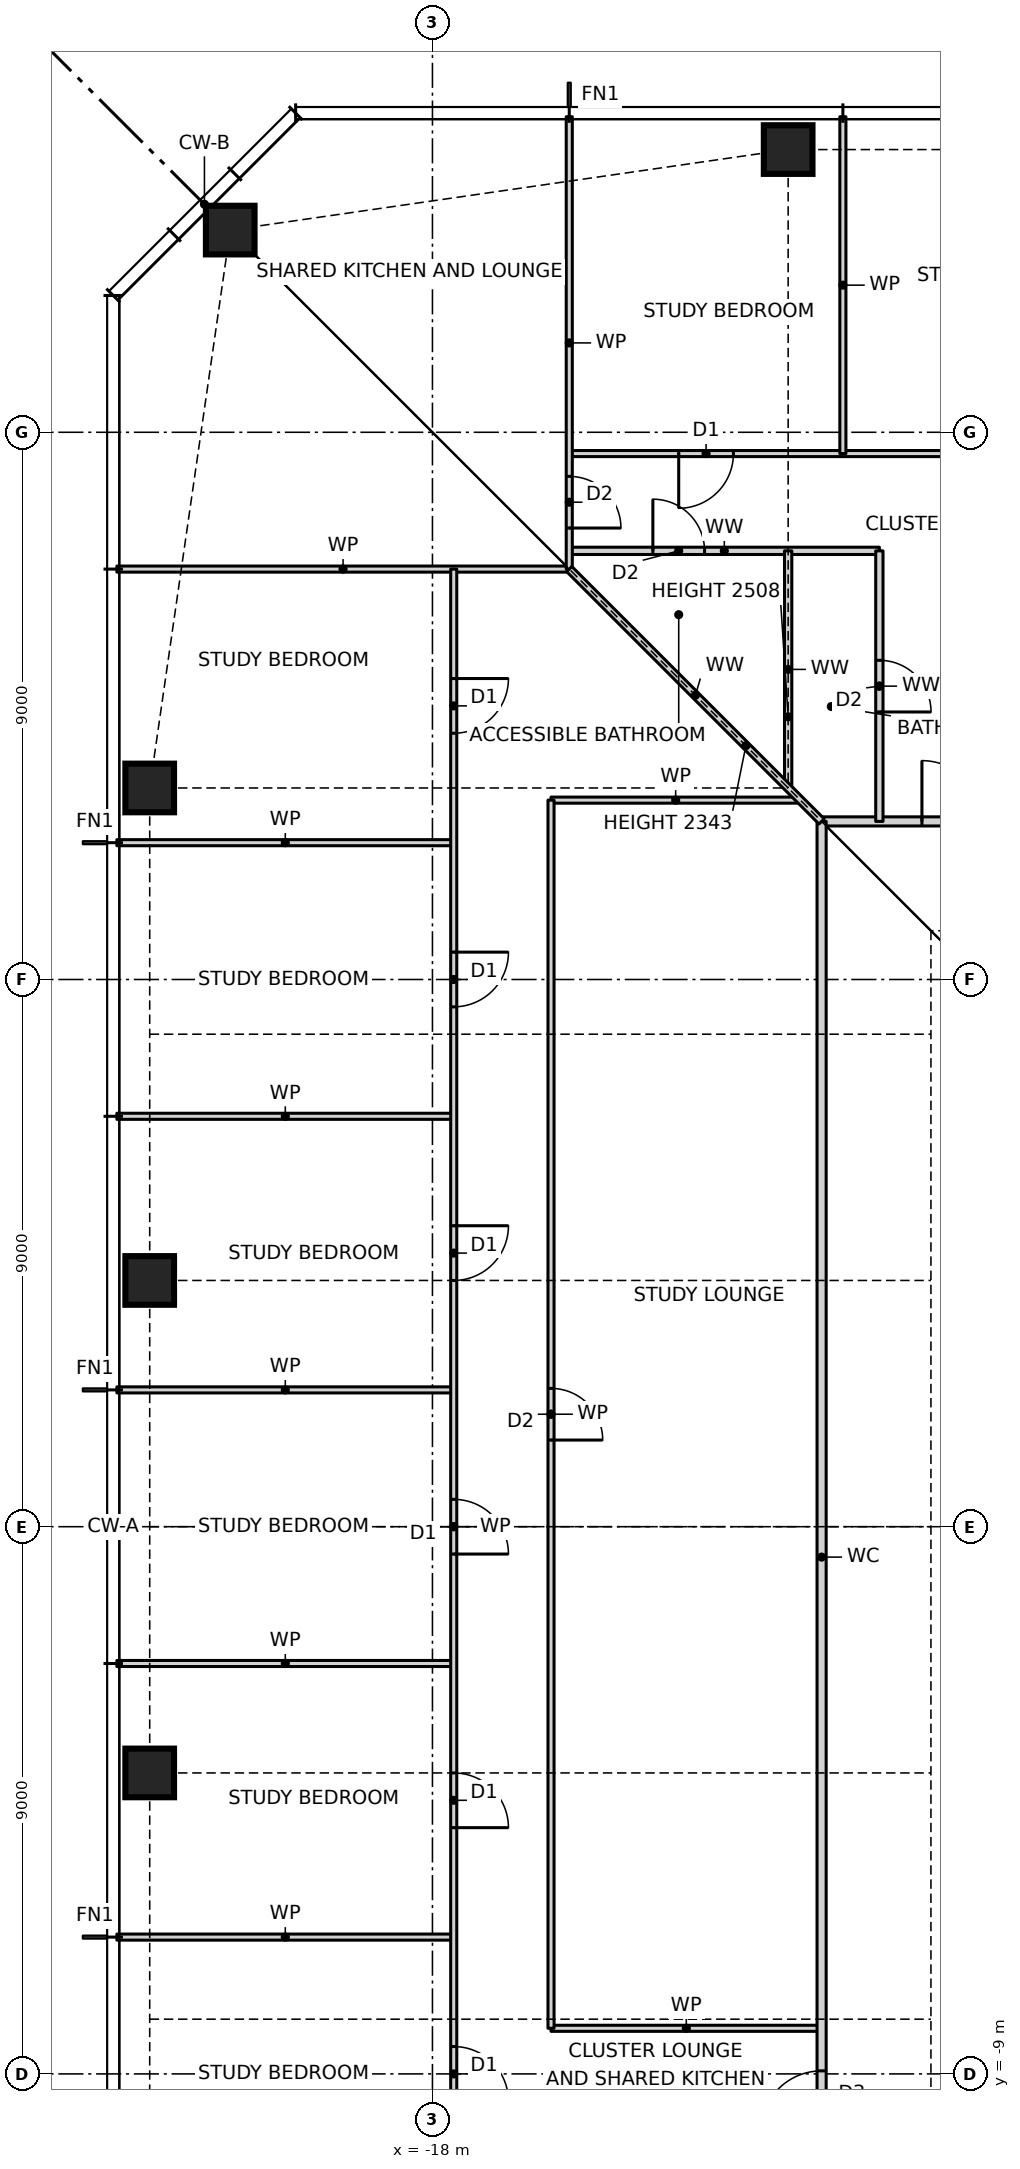
"""IFC4 building model, lengths in metres.
Left out: names, types, materials, properties, quantities, classifications, styles, units other than length and angle.
Written with IfcOpenShell. Run it as: python <this file> out.ifc"""

import sys

from ifc_helpers import new_model, si_unit, direction, frame, frame_2d, origin, origin_2d, place, context, subcontext, project, spatial, rectangle, hollow_rectangle, extrude, element, fill, save


model = new_model("IFC4")
c1 = context("Model", 3, precision=1e-05, world=origin(), true_north=direction((0.0, 1.0)))
c2 = subcontext(c1, "Body", "Model", "MODEL_VIEW")
j1 = project(units=[si_unit("LENGTHUNIT", "METRE"), si_unit("PLANEANGLEUNIT", "RADIAN")], contexts=[c1])
p1 = place(None, origin())
s1 = spatial("IfcSite", under=j1, at=p1, CompositionType="ELEMENT")
p2 = place(p1, origin())
s2 = spatial("IfcBuilding", under=s1, at=p2, CompositionType="ELEMENT")
p3 = place(p2, frame((0.0, 0.0, 22.0)))
s3 = spatial("IfcBuildingStorey", under=s2, at=p3, CompositionType="ELEMENT", Elevation=22.0)
for number, where, z_axis, x_axis in (
    (1, (-12.15, 22.65, 0.0), (0.0, 0.0, 1.0), (1.0, 0.0, 0.0)),
    (2, (-21.326, 21.326, 0.0), (0.0, 0.0, 1.0), (1.0, 0.0, 0.0)),
    (3, (-22.65, 12.15, 0.0), (0.0, 0.0, 1.0), (1.0, 0.0, 0.0)),
    (4, (-22.65, 4.05, 0.0), (0.0, 0.0, 1.0), (1.0, 0.0, 0.0)),
    (5, (-22.65, -4.05, 0.0), (0.0, 0.0, 1.0), (1.0, 0.0, 0.0)),
):
    element("IfcColumn", number, at=place(p3, frame(where, z_axis=z_axis, x_axis=x_axis)), inside=s3, PredefinedType="COLUMN", context=c2, shape_type="SweptSolid", body=[
        extrude(hollow_rectangle(XDim=0.8, YDim=0.8, WallThickness=0.09, at=origin_2d()), origin(), (0.0, 0.0, 1.0), 3.5),
    ])
p4 = place(p3, frame((-16.05, -8.25, 0.0), z_axis=(0.0, 0.0, 1.0), x_axis=(1.0, 0.0, 0.0)))
e6 = element("IfcWall", 6, at=p4, inside=s3, PredefinedType="PARTITIONING", context=c2, shape_type="SweptSolid", body=[
    extrude(rectangle(XDim=4.45, YDim=0.1, at=frame_2d((2.225, 0.0))), origin(), (0.0, 0.0, 1.0), 3.27),
])
for number, where, z_axis, x_axis in (
    (7, (-23.19, -6.75, 0.0), (0.0, 0.0, 1.0), (1.0, 0.0, 0.0)),
    (8, (-23.19, -2.25, 0.0), (0.0, 0.0, 1.0), (1.0, 0.0, 0.0)),
    (9, (-23.19, 2.25, 0.0), (0.0, 0.0, 1.0), (1.0, 0.0, 0.0)),
    (10, (-23.19, 6.75, 0.0), (0.0, 0.0, 1.0), (1.0, 0.0, 0.0)),
    (11, (-23.19, 11.25, 0.0), (0.0, 0.0, 1.0), (1.0, 0.0, 0.0)),
):
    element("IfcWall", number, at=place(p3, frame(where, z_axis=z_axis, x_axis=x_axis)), inside=s3, PredefinedType="PARTITIONING", context=c2, shape_type="SweptSolid", body=[
        extrude(rectangle(XDim=5.54, YDim=0.1, at=frame_2d((2.77, 0.0))), origin(), (0.0, 0.0, 1.0), 3.27),
    ])
p5 = place(p3, frame((-11.6, 11.6, 0.0), z_axis=(0.0, 0.0, 1.0), x_axis=(1.0, 0.0, 0.0)))
e12 = element("IfcWall", 12, at=p5, inside=s3, PredefinedType="PARTITIONING", context=c2, shape_type="SweptSolid", body=[
    extrude(rectangle(XDim=23.2, YDim=0.15, at=frame_2d((11.6, 0.0))), origin(), (0.0, 0.0, 1.0), 3.27),
])
p6 = place(p5, frame((1.65, 0.0, 0.0)))
e13 = element("IfcOpeningElement", 13, at=p6, cuts=e12, PredefinedType="OPENING", context=c2, shape_type="SweptSolid", body=[
    extrude(rectangle(XDim=1.0, YDim=2.1, at=frame_2d((0.5, 1.05))), frame((0.0, 0.085, 0.0), z_axis=(0.0, -1.0, 0.0), x_axis=(1.0, 0.0, 0.0)), (0.0, 0.0, 1.0), 0.17),
])
p7 = place(p3, frame((-16.05, 11.95, 0.0), z_axis=(0.0, 0.0, 1.0), x_axis=(1.0, 0.0, 0.0)))
e14 = element("IfcWall", 14, at=p7, inside=s3, PredefinedType="PARTITIONING", context=c2, shape_type="SweptSolid", body=[
    extrude(rectangle(XDim=4.1, YDim=0.1, at=frame_2d((2.05, 0.0))), origin(), (0.0, 0.0, 1.0), 3.27),
])
p8 = place(p3, frame((-23.19, 15.75, 0.0), z_axis=(0.0, 0.0, 1.0), x_axis=(1.0, 0.0, 0.0)))
e15 = element("IfcWall", 15, at=p8, inside=s3, PredefinedType="PARTITIONING", context=c2, shape_type="SweptSolid", body=[
    extrude(rectangle(XDim=7.44, YDim=0.1, at=frame_2d((3.72, 0.0))), origin(), (0.0, 0.0, 1.0), 3.27),
])
p9 = place(p3, frame((-15.75, 16.05, 0.0), z_axis=(0.0, 0.0, 1.0), x_axis=(1.0, 0.0, 0.0)))
e16 = element("IfcWall", 16, at=p9, inside=s3, PredefinedType="PARTITIONING", context=c2, shape_type="SweptSolid", body=[
    extrude(rectangle(XDim=5.1, YDim=0.12, at=frame_2d((2.55, 0.0))), origin(), (0.0, 0.0, 1.0), 3.27),
])
p10 = place(p9, frame((1.375, 0.0, 0.0)))
e17 = element("IfcOpeningElement", 17, at=p10, cuts=e16, PredefinedType="OPENING", context=c2, shape_type="SweptSolid", body=[
    extrude(rectangle(XDim=0.85, YDim=2.1, at=frame_2d((0.425, 1.05))), frame((0.0, 0.07, 0.0), z_axis=(0.0, -1.0, 0.0), x_axis=(1.0, 0.0, 0.0)), (0.0, 0.0, 1.0), 0.14),
])
p11 = place(p3, frame((-15.75, 17.65, 0.0), z_axis=(0.0, 0.0, 1.0), x_axis=(1.0, 0.0, 0.0)))
e18 = element("IfcWall", 18, at=p11, inside=s3, PredefinedType="PARTITIONING", context=c2, shape_type="SweptSolid", body=[
    extrude(rectangle(XDim=31.5, YDim=0.1, at=frame_2d((15.75, 0.0))), origin(), (0.0, 0.0, 1.0), 3.27),
])
p12 = place(p11, frame((28.8, 0.0, 0.0)))
e19 = element("IfcOpeningElement", 19, at=p12, cuts=e18, PredefinedType="OPENING", context=c2, shape_type="SweptSolid", body=[
    extrude(rectangle(XDim=0.9, YDim=2.1, at=frame_2d((0.45, 1.05))), frame((0.0, 0.06, 0.0), z_axis=(0.0, -1.0, 0.0), x_axis=(1.0, 0.0, 0.0)), (0.0, 0.0, 1.0), 0.12),
])
p13 = place(p11, frame((24.3, 0.0, 0.0)))
e20 = element("IfcOpeningElement", 20, at=p13, cuts=e18, PredefinedType="OPENING", context=c2, shape_type="SweptSolid", body=[
    extrude(rectangle(XDim=0.9, YDim=2.1, at=frame_2d((0.45, 1.05))), frame((0.0, 0.06, 0.0), z_axis=(0.0, -1.0, 0.0), x_axis=(1.0, 0.0, 0.0)), (0.0, 0.0, 1.0), 0.12),
])
p14 = place(p11, frame((19.8, 0.0, 0.0)))
e21 = element("IfcOpeningElement", 21, at=p14, cuts=e18, PredefinedType="OPENING", context=c2, shape_type="SweptSolid", body=[
    extrude(rectangle(XDim=0.9, YDim=2.1, at=frame_2d((0.45, 1.05))), frame((0.0, 0.06, 0.0), z_axis=(0.0, -1.0, 0.0), x_axis=(1.0, 0.0, 0.0)), (0.0, 0.0, 1.0), 0.12),
])
p15 = place(p11, frame((15.3, 0.0, 0.0)))
e22 = element("IfcOpeningElement", 22, at=p15, cuts=e18, PredefinedType="OPENING", context=c2, shape_type="SweptSolid", body=[
    extrude(rectangle(XDim=0.9, YDim=2.1, at=frame_2d((0.45, 1.05))), frame((0.0, 0.06, 0.0), z_axis=(0.0, -1.0, 0.0), x_axis=(1.0, 0.0, 0.0)), (0.0, 0.0, 1.0), 0.12),
])
p16 = place(p11, frame((10.8, 0.0, 0.0)))
e23 = element("IfcOpeningElement", 23, at=p16, cuts=e18, PredefinedType="OPENING", context=c2, shape_type="SweptSolid", body=[
    extrude(rectangle(XDim=0.9, YDim=2.1, at=frame_2d((0.45, 1.05))), frame((0.0, 0.06, 0.0), z_axis=(0.0, -1.0, 0.0), x_axis=(1.0, 0.0, 0.0)), (0.0, 0.0, 1.0), 0.12),
])
p17 = place(p11, frame((6.3, 0.0, 0.0)))
e24 = element("IfcOpeningElement", 24, at=p17, cuts=e18, PredefinedType="OPENING", context=c2, shape_type="SweptSolid", body=[
    extrude(rectangle(XDim=0.9, YDim=2.1, at=frame_2d((0.45, 1.05))), frame((0.0, 0.06, 0.0), z_axis=(0.0, -1.0, 0.0), x_axis=(1.0, 0.0, 0.0)), (0.0, 0.0, 1.0), 0.12),
])
p18 = place(p11, frame((1.8, 0.0, 0.0)))
e25 = element("IfcOpeningElement", 25, at=p18, cuts=e18, PredefinedType="OPENING", context=c2, shape_type="SweptSolid", body=[
    extrude(rectangle(XDim=0.9, YDim=2.1, at=frame_2d((0.45, 1.05))), frame((0.0, 0.06, 0.0), z_axis=(0.0, -1.0, 0.0), x_axis=(1.0, 0.0, 0.0)), (0.0, 0.0, 1.0), 0.12),
])
p19 = place(p3, frame((-10.65, 11.6, 0.0), z_axis=(0.0, 0.0, 1.0), x_axis=(0.0, 1.0, 0.0)))
e26 = element("IfcWall", 26, at=p19, inside=s3, PredefinedType="PARTITIONING", context=c2, shape_type="SweptSolid", body=[
    extrude(rectangle(XDim=4.45, YDim=0.12, at=frame_2d((2.225, 0.0))), origin(), (0.0, 0.0, 1.0), 3.27),
])
p20 = place(p19, frame((1.8, 0.0, 0.0)))
e27 = element("IfcOpeningElement", 27, at=p20, cuts=e26, PredefinedType="OPENING", context=c2, shape_type="SweptSolid", body=[
    extrude(rectangle(XDim=0.85, YDim=2.1, at=frame_2d((0.425, 1.05))), frame((0.0, 0.07, 0.0), z_axis=(0.0, -1.0, 0.0), x_axis=(1.0, 0.0, 0.0)), (0.0, 0.0, 1.0), 0.14),
])
p21 = place(p3, frame((-11.25, 17.65, 0.0), z_axis=(0.0, 0.0, 1.0), x_axis=(0.0, 1.0, 0.0)))
e28 = element("IfcWall", 28, at=p21, inside=s3, PredefinedType="PARTITIONING", context=c2, shape_type="SweptSolid", body=[
    extrude(rectangle(XDim=5.54, YDim=0.1, at=frame_2d((2.77, 0.0))), origin(), (0.0, 0.0, 1.0), 3.27),
])
p22 = place(p3, frame((-11.6, -12.6, 0.0), z_axis=(0.0, 0.0, 1.0), x_axis=(0.0, 1.0, 0.0)))
e29 = element("IfcWall", 29, at=p22, inside=s3, PredefinedType="PARTITIONING", context=c2, shape_type="SweptSolid", body=[
    extrude(rectangle(XDim=24.2, YDim=0.15, at=frame_2d((12.1, 0.0))), origin(), (0.0, 0.0, 1.0), 3.27),
])
p23 = place(p22, frame((2.65, 0.0, 0.0)))
e30 = element("IfcOpeningElement", 30, at=p23, cuts=e29, PredefinedType="OPENING", context=c2, shape_type="SweptSolid", body=[
    extrude(rectangle(XDim=1.0, YDim=2.1, at=frame_2d((0.5, 1.05))), frame((0.0, 0.085, 0.0), z_axis=(0.0, -1.0, 0.0), x_axis=(1.0, 0.0, 0.0)), (0.0, 0.0, 1.0), 0.17),
])
p24 = place(p3, frame((-12.15, 12.15, 0.0), z_axis=(0.0, 0.0, 1.0), x_axis=(0.0, 1.0, 0.0)))
e31 = element("IfcWall", 31, at=p24, inside=s3, PredefinedType="PARTITIONING", context=c2, shape_type="SweptSolid", body=[
    extrude(rectangle(XDim=3.9, YDim=0.12, at=frame_2d((1.95, 0.0))), origin(), (0.0, 0.0, 1.0), 2.508),
])
p25 = place(p3, frame((-15.75, 15.75, 0.0), z_axis=(0.0, 0.0, 1.0), x_axis=(0.0, 1.0, 0.0)))
e32 = element("IfcWall", 32, at=p25, inside=s3, PredefinedType="PARTITIONING", context=c2, shape_type="SweptSolid", body=[
    extrude(rectangle(XDim=7.44, YDim=0.1, at=frame_2d((3.72, 0.0))), origin(), (0.0, 0.0, 1.0), 3.27),
])
p26 = place(p25, frame((0.675, 0.0, 0.0)))
e33 = element("IfcOpeningElement", 33, at=p26, cuts=e32, PredefinedType="OPENING", context=c2, shape_type="SweptSolid", body=[
    extrude(rectangle(XDim=0.85, YDim=2.1, at=frame_2d((0.425, 1.05))), frame((0.0, 0.06, 0.0), z_axis=(0.0, -1.0, 0.0), x_axis=(1.0, 0.0, 0.0)), (0.0, 0.0, 1.0), 0.12),
])
p27 = place(p3, frame((-16.05, -8.25, 0.0), z_axis=(0.0, 0.0, 1.0), x_axis=(0.0, 1.0, 0.0)))
e34 = element("IfcWall", 34, at=p27, inside=s3, PredefinedType="PARTITIONING", context=c2, shape_type="SweptSolid", body=[
    extrude(rectangle(XDim=20.2, YDim=0.1, at=frame_2d((10.1, 0.0))), origin(), (0.0, 0.0, 1.0), 3.27),
])
p28 = place(p27, frame((9.675, 0.0, 0.0)))
e35 = element("IfcOpeningElement", 35, at=p28, cuts=e34, PredefinedType="OPENING", context=c2, shape_type="SweptSolid", body=[
    extrude(rectangle(XDim=0.85, YDim=2.1, at=frame_2d((0.425, 1.05))), frame((0.0, 0.06, 0.0), z_axis=(0.0, -1.0, 0.0), x_axis=(1.0, 0.0, 0.0)), (0.0, 0.0, 1.0), 0.12),
])
p29 = place(p3, frame((-17.65, -15.75, 0.0), z_axis=(0.0, 0.0, 1.0), x_axis=(0.0, 1.0, 0.0)))
e36 = element("IfcWall", 36, at=p29, inside=s3, PredefinedType="PARTITIONING", context=c2, shape_type="SweptSolid", body=[
    extrude(rectangle(XDim=31.5, YDim=0.1, at=frame_2d((15.75, 0.0))), origin(), (0.0, 0.0, 1.0), 3.27),
])
p30 = place(p29, frame((28.8, 0.0, 0.0)))
e37 = element("IfcOpeningElement", 37, at=p30, cuts=e36, PredefinedType="OPENING", context=c2, shape_type="SweptSolid", body=[
    extrude(rectangle(XDim=0.9, YDim=2.1, at=frame_2d((0.45, 1.05))), frame((0.0, 0.06, 0.0), z_axis=(0.0, -1.0, 0.0), x_axis=(1.0, 0.0, 0.0)), (0.0, 0.0, 1.0), 0.12),
])
p31 = place(p29, frame((24.3, 0.0, 0.0)))
e38 = element("IfcOpeningElement", 38, at=p31, cuts=e36, PredefinedType="OPENING", context=c2, shape_type="SweptSolid", body=[
    extrude(rectangle(XDim=0.9, YDim=2.1, at=frame_2d((0.45, 1.05))), frame((0.0, 0.06, 0.0), z_axis=(0.0, -1.0, 0.0), x_axis=(1.0, 0.0, 0.0)), (0.0, 0.0, 1.0), 0.12),
])
p32 = place(p29, frame((19.8, 0.0, 0.0)))
e39 = element("IfcOpeningElement", 39, at=p32, cuts=e36, PredefinedType="OPENING", context=c2, shape_type="SweptSolid", body=[
    extrude(rectangle(XDim=0.9, YDim=2.1, at=frame_2d((0.45, 1.05))), frame((0.0, 0.06, 0.0), z_axis=(0.0, -1.0, 0.0), x_axis=(1.0, 0.0, 0.0)), (0.0, 0.0, 1.0), 0.12),
])
p33 = place(p29, frame((15.3, 0.0, 0.0)))
e40 = element("IfcOpeningElement", 40, at=p33, cuts=e36, PredefinedType="OPENING", context=c2, shape_type="SweptSolid", body=[
    extrude(rectangle(XDim=0.9, YDim=2.1, at=frame_2d((0.45, 1.05))), frame((0.0, 0.06, 0.0), z_axis=(0.0, -1.0, 0.0), x_axis=(1.0, 0.0, 0.0)), (0.0, 0.0, 1.0), 0.12),
])
p34 = place(p29, frame((10.8, 0.0, 0.0)))
e41 = element("IfcOpeningElement", 41, at=p34, cuts=e36, PredefinedType="OPENING", context=c2, shape_type="SweptSolid", body=[
    extrude(rectangle(XDim=0.9, YDim=2.1, at=frame_2d((0.45, 1.05))), frame((0.0, 0.06, 0.0), z_axis=(0.0, -1.0, 0.0), x_axis=(1.0, 0.0, 0.0)), (0.0, 0.0, 1.0), 0.12),
])
p35 = place(p29, frame((6.3, 0.0, 0.0)))
e42 = element("IfcOpeningElement", 42, at=p35, cuts=e36, PredefinedType="OPENING", context=c2, shape_type="SweptSolid", body=[
    extrude(rectangle(XDim=0.9, YDim=2.1, at=frame_2d((0.45, 1.05))), frame((0.0, 0.06, 0.0), z_axis=(0.0, -1.0, 0.0), x_axis=(1.0, 0.0, 0.0)), (0.0, 0.0, 1.0), 0.12),
])
p36 = place(p29, frame((1.8, 0.0, 0.0)))
e43 = element("IfcOpeningElement", 43, at=p36, cuts=e36, PredefinedType="OPENING", context=c2, shape_type="SweptSolid", body=[
    extrude(rectangle(XDim=0.9, YDim=2.1, at=frame_2d((0.45, 1.05))), frame((0.0, 0.06, 0.0), z_axis=(0.0, -1.0, 0.0), x_axis=(1.0, 0.0, 0.0)), (0.0, 0.0, 1.0), 0.12),
])
p37 = place(p3, frame((-11.6, 11.6, 0.0), z_axis=(0.0, 0.0, 1.0), x_axis=(-0.707106781187, 0.707106781187, 0.0)))
e44 = element("IfcWall", 44, at=p37, inside=s3, PredefinedType="PARTITIONING", context=c2, shape_type="SweptSolid", body=[
    extrude(rectangle(XDim=5.869, YDim=0.12, at=frame_2d((2.935, 0.0))), origin(), (0.0, 0.0, 1.0), 2.343),
])
p38 = place(p18, frame((0.9, 0.0, 0.0), z_axis=(0.0, 0.0, 1.0), x_axis=(-1.0, 0.0, 0.0)))
e45 = element("IfcDoor", 45, at=p38, inside=s3, OperationType="SINGLE_SWING_RIGHT", PredefinedType="DOOR", context=c2, shape_type="SweptSolid", body=[
    extrude(rectangle(XDim=0.9, YDim=2.1, at=frame_2d((0.45, 1.05))), frame((0.0, 0.025, 0.0), z_axis=(0.0, -1.0, 0.0), x_axis=(1.0, 0.0, 0.0)), (0.0, 0.0, 1.0), 0.05),
])
fill(e25, e45)
p39 = place(p6, origin())
e46 = element("IfcDoor", 46, at=p39, inside=s3, OperationType="SINGLE_SWING_LEFT", PredefinedType="DOOR", context=c2, shape_type="SweptSolid", body=[
    extrude(rectangle(XDim=1.0, YDim=2.1, at=frame_2d((0.5, 1.05))), frame((0.0, 0.025, 0.0), z_axis=(0.0, -1.0, 0.0), x_axis=(1.0, 0.0, 0.0)), (0.0, 0.0, 1.0), 0.05),
])
fill(e13, e46)
p40 = place(p20, frame((0.85, 0.0, 0.0), z_axis=(0.0, 0.0, 1.0), x_axis=(-1.0, 0.0, 0.0)))
e47 = element("IfcDoor", 47, at=p40, inside=s3, OperationType="SINGLE_SWING_RIGHT", PredefinedType="DOOR", context=c2, shape_type="SweptSolid", body=[
    extrude(rectangle(XDim=0.85, YDim=2.1, at=frame_2d((0.425, 1.05))), frame((0.0, 0.025, 0.0), z_axis=(0.0, -1.0, 0.0), x_axis=(1.0, 0.0, 0.0)), (0.0, 0.0, 1.0), 0.05),
])
fill(e27, e47)
p41 = place(p10, origin())
e48 = element("IfcDoor", 48, at=p41, inside=s3, OperationType="SINGLE_SWING_LEFT", PredefinedType="DOOR", context=c2, shape_type="SweptSolid", body=[
    extrude(rectangle(XDim=0.85, YDim=2.1, at=frame_2d((0.425, 1.05))), frame((0.0, 0.025, 0.0), z_axis=(0.0, -1.0, 0.0), x_axis=(1.0, 0.0, 0.0)), (0.0, 0.0, 1.0), 0.05),
])
fill(e17, e48)
p42 = place(p30, frame((0.9, 0.0, 0.0), z_axis=(0.0, 0.0, 1.0), x_axis=(-1.0, 0.0, 0.0)))
e49 = element("IfcDoor", 49, at=p42, inside=s3, OperationType="SINGLE_SWING_LEFT", PredefinedType="DOOR", context=c2, shape_type="SweptSolid", body=[
    extrude(rectangle(XDim=0.9, YDim=2.1, at=frame_2d((0.45, 1.05))), frame((0.0, 0.025, 0.0), z_axis=(0.0, -1.0, 0.0), x_axis=(1.0, 0.0, 0.0)), (0.0, 0.0, 1.0), 0.05),
])
fill(e37, e49)
p43 = place(p31, frame((0.9, 0.0, 0.0), z_axis=(0.0, 0.0, 1.0), x_axis=(-1.0, 0.0, 0.0)))
e50 = element("IfcDoor", 50, at=p43, inside=s3, OperationType="SINGLE_SWING_LEFT", PredefinedType="DOOR", context=c2, shape_type="SweptSolid", body=[
    extrude(rectangle(XDim=0.9, YDim=2.1, at=frame_2d((0.45, 1.05))), frame((0.0, 0.025, 0.0), z_axis=(0.0, -1.0, 0.0), x_axis=(1.0, 0.0, 0.0)), (0.0, 0.0, 1.0), 0.05),
])
fill(e38, e50)
p44 = place(p32, frame((0.9, 0.0, 0.0), z_axis=(0.0, 0.0, 1.0), x_axis=(-1.0, 0.0, 0.0)))
e51 = element("IfcDoor", 51, at=p44, inside=s3, OperationType="SINGLE_SWING_LEFT", PredefinedType="DOOR", context=c2, shape_type="SweptSolid", body=[
    extrude(rectangle(XDim=0.9, YDim=2.1, at=frame_2d((0.45, 1.05))), frame((0.0, 0.025, 0.0), z_axis=(0.0, -1.0, 0.0), x_axis=(1.0, 0.0, 0.0)), (0.0, 0.0, 1.0), 0.05),
])
fill(e39, e51)
p45 = place(p33, frame((0.9, 0.0, 0.0), z_axis=(0.0, 0.0, 1.0), x_axis=(-1.0, 0.0, 0.0)))
e52 = element("IfcDoor", 52, at=p45, inside=s3, OperationType="SINGLE_SWING_RIGHT", PredefinedType="DOOR", context=c2, shape_type="SweptSolid", body=[
    extrude(rectangle(XDim=0.9, YDim=2.1, at=frame_2d((0.45, 1.05))), frame((0.0, 0.025, 0.0), z_axis=(0.0, -1.0, 0.0), x_axis=(1.0, 0.0, 0.0)), (0.0, 0.0, 1.0), 0.05),
])
fill(e40, e52)
p46 = place(p34, frame((0.9, 0.0, 0.0), z_axis=(0.0, 0.0, 1.0), x_axis=(-1.0, 0.0, 0.0)))
e53 = element("IfcDoor", 53, at=p46, inside=s3, OperationType="SINGLE_SWING_RIGHT", PredefinedType="DOOR", context=c2, shape_type="SweptSolid", body=[
    extrude(rectangle(XDim=0.9, YDim=2.1, at=frame_2d((0.45, 1.05))), frame((0.0, 0.025, 0.0), z_axis=(0.0, -1.0, 0.0), x_axis=(1.0, 0.0, 0.0)), (0.0, 0.0, 1.0), 0.05),
])
fill(e41, e53)
p47 = place(p35, frame((0.9, 0.0, 0.0), z_axis=(0.0, 0.0, 1.0), x_axis=(-1.0, 0.0, 0.0)))
e54 = element("IfcDoor", 54, at=p47, inside=s3, OperationType="SINGLE_SWING_RIGHT", PredefinedType="DOOR", context=c2, shape_type="SweptSolid", body=[
    extrude(rectangle(XDim=0.9, YDim=2.1, at=frame_2d((0.45, 1.05))), frame((0.0, 0.025, 0.0), z_axis=(0.0, -1.0, 0.0), x_axis=(1.0, 0.0, 0.0)), (0.0, 0.0, 1.0), 0.05),
])
fill(e42, e54)
p48 = place(p23, origin())
e55 = element("IfcDoor", 55, at=p48, inside=s3, OperationType="SINGLE_SWING_LEFT", PredefinedType="DOOR", context=c2, shape_type="SweptSolid", body=[
    extrude(rectangle(XDim=1.0, YDim=2.1, at=frame_2d((0.5, 1.05))), frame((0.0, 0.025, 0.0), z_axis=(0.0, -1.0, 0.0), x_axis=(1.0, 0.0, 0.0)), (0.0, 0.0, 1.0), 0.05),
])
fill(e30, e55)
p49 = place(p28, frame((0.85, 0.0, 0.0), z_axis=(0.0, 0.0, 1.0), x_axis=(-1.0, 0.0, 0.0)))
e56 = element("IfcDoor", 56, at=p49, inside=s3, OperationType="SINGLE_SWING_RIGHT", PredefinedType="DOOR", context=c2, shape_type="SweptSolid", body=[
    extrude(rectangle(XDim=0.85, YDim=2.1, at=frame_2d((0.425, 1.05))), frame((0.0, 0.025, 0.0), z_axis=(0.0, -1.0, 0.0), x_axis=(1.0, 0.0, 0.0)), (0.0, 0.0, 1.0), 0.05),
])
fill(e35, e56)
p50 = place(p26, frame((0.85, 0.0, 0.0), z_axis=(0.0, 0.0, 1.0), x_axis=(-1.0, 0.0, 0.0)))
e57 = element("IfcDoor", 57, at=p50, inside=s3, OperationType="SINGLE_SWING_RIGHT", PredefinedType="DOOR", context=c2, shape_type="SweptSolid", body=[
    extrude(rectangle(XDim=0.85, YDim=2.1, at=frame_2d((0.425, 1.05))), frame((0.0, 0.025, 0.0), z_axis=(0.0, -1.0, 0.0), x_axis=(1.0, 0.0, 0.0)), (0.0, 0.0, 1.0), 0.05),
])
fill(e33, e57)
save(model, sys.argv[1])
